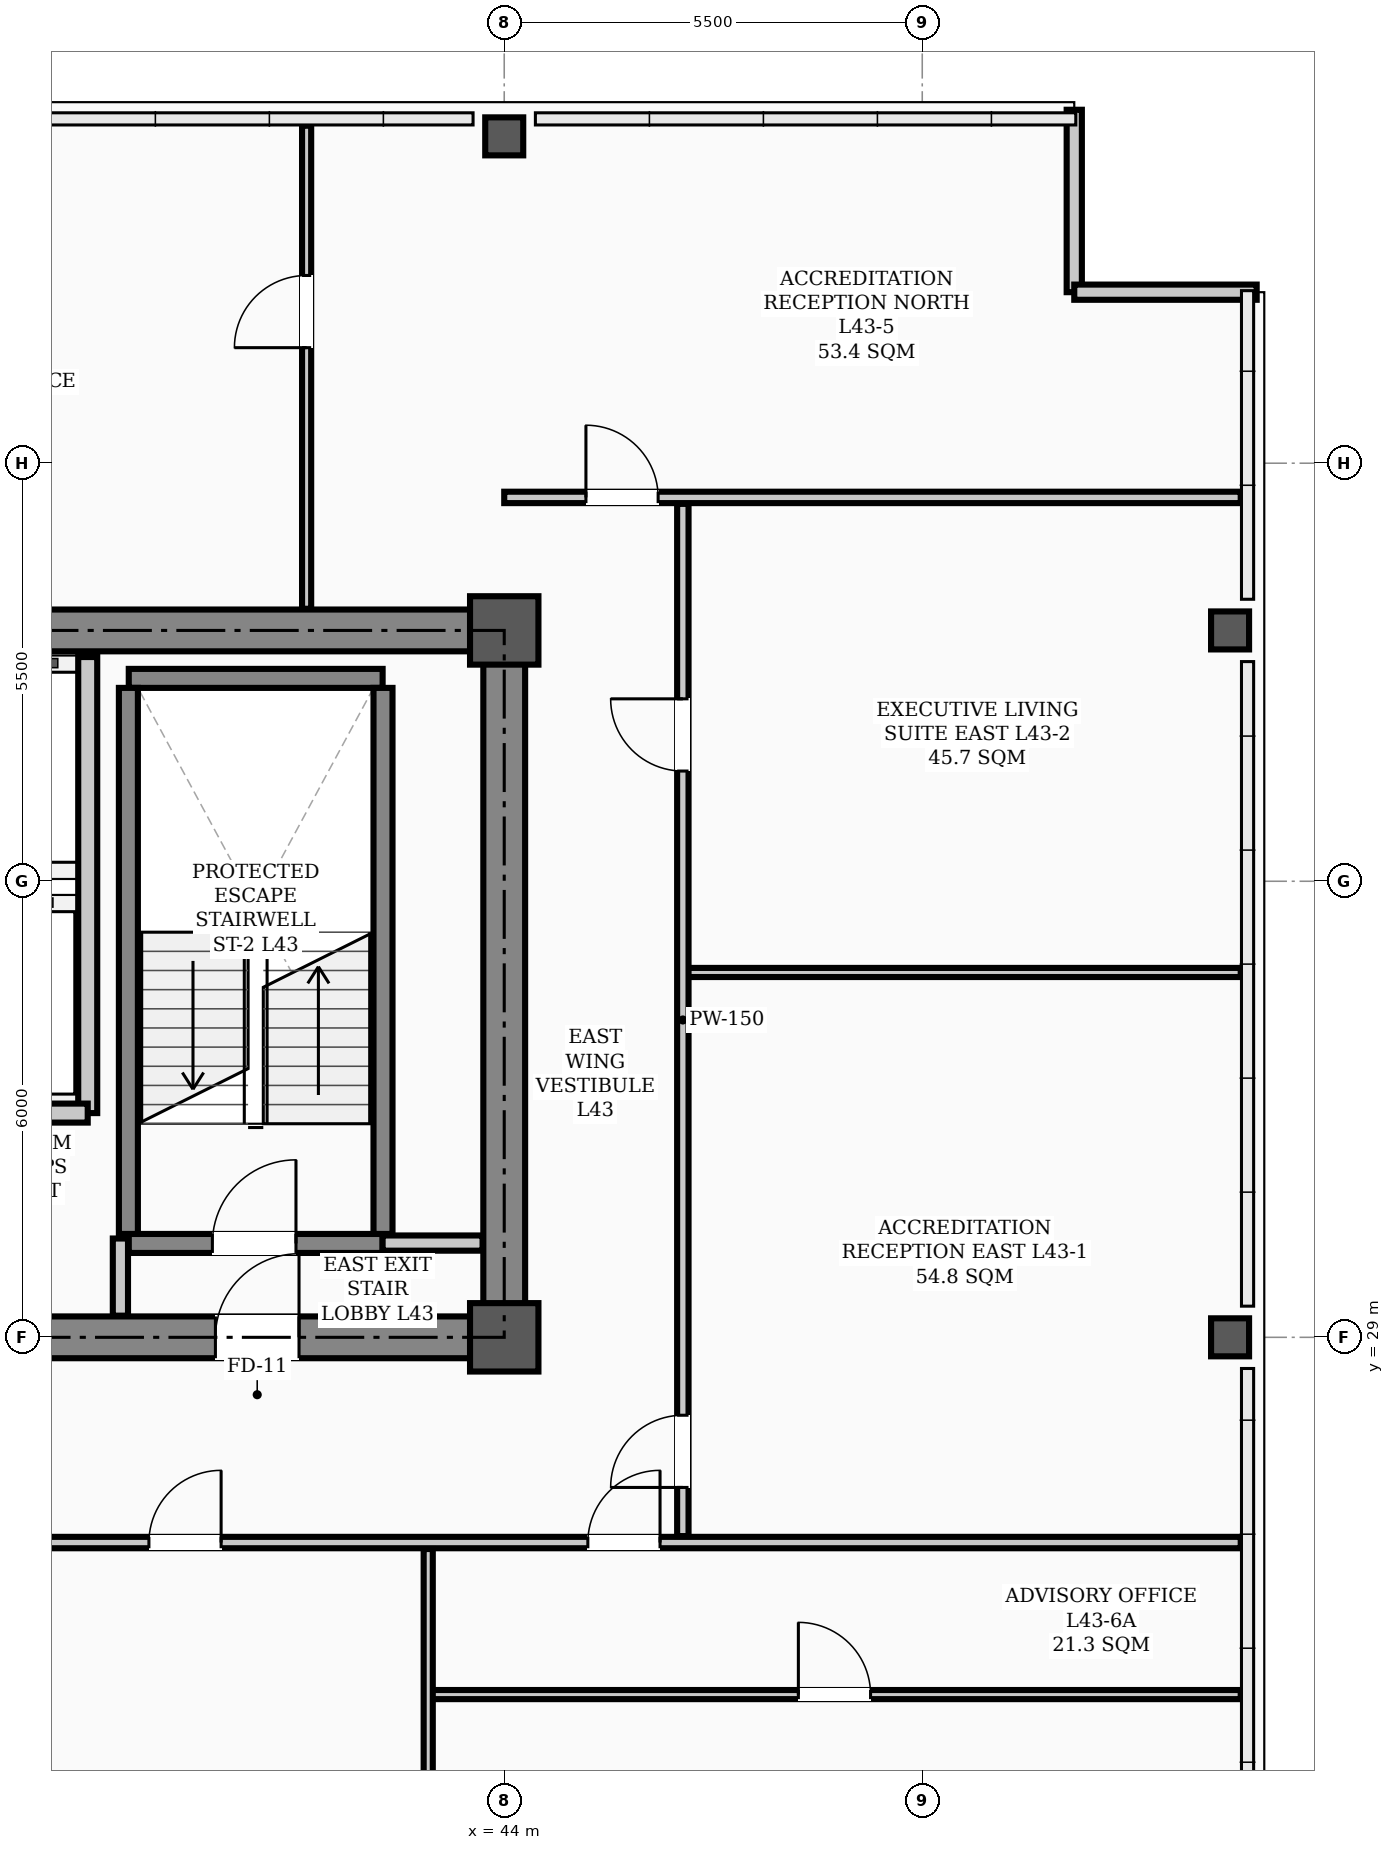
"""IFC4 building model, lengths in metres.
Left out: names, types, materials, properties, quantities, classifications, styles, units other than length and angle.
Written with IfcOpenShell. Run it as: python <this file> out.ifc"""

import sys

from ifc_helpers import new_model, si_unit, direction, frame, frame_2d, origin, origin_2d, place, context, subcontext, project, spatial, rectangle, hollow_rectangle, extrude, element, fill, save


model = new_model("IFC4")
c1 = context("Model", 3, precision=1e-05, world=origin(), true_north=direction((0.0, 1.0)))
c2 = subcontext(c1, "Body", "Model", "MODEL_VIEW")
j1 = project(units=[si_unit("LENGTHUNIT", "METRE"), si_unit("PLANEANGLEUNIT", "RADIAN")], contexts=[c1])
p1 = place(None, origin())
s1 = spatial("IfcSite", under=j1, at=p1, CompositionType="ELEMENT")
p2 = place(p1, origin())
s2 = spatial("IfcBuilding", under=s1, at=p2, CompositionType="ELEMENT")
p3 = place(p2, frame((0.0, 0.0, 173.4)))
s3 = spatial("IfcBuildingStorey", under=s2, at=p3, CompositionType="ELEMENT", Elevation=173.4)
for number, where, z_axis, x_axis in (
    (1, (44.0, 29.0, 0.0), (0.0, 0.0, 1.0), (1.0, 0.0, 0.0)),
    (2, (44.0, 38.3, 0.0), (0.0, 0.0, 1.0), (1.0, 0.0, 0.0)),
):
    element("IfcColumn", number, at=place(p3, frame(where, z_axis=z_axis, x_axis=x_axis)), inside=s3, PredefinedType="COLUMN", context=c2, shape_type="SweptSolid", body=[
        extrude(hollow_rectangle(XDim=0.9, YDim=0.9, WallThickness=0.035, InnerFilletRadius=0.017, OuterFilletRadius=0.052, at=origin_2d()), origin(), (0.0, 0.0, 1.0), 3.9),
    ])
for number, where, z_axis, x_axis in (
    (3, (44.0, 44.8, 0.0), (0.0, 0.0, 1.0), (1.0, 0.0, 0.0)),
    (4, (53.55, 29.0, 0.0), (0.0, 0.0, 1.0), (1.0, 0.0, 0.0)),
    (5, (53.55, 38.3, 0.0), (0.0, 0.0, 1.0), (1.0, 0.0, 0.0)),
):
    element("IfcColumn", number, at=place(p3, frame(where, z_axis=z_axis, x_axis=x_axis)), inside=s3, PredefinedType="COLUMN", context=c2, shape_type="SweptSolid", body=[
        extrude(hollow_rectangle(XDim=0.5, YDim=0.5, WallThickness=0.024, InnerFilletRadius=0.012, OuterFilletRadius=0.036, at=origin_2d()), origin(), (0.0, 0.0, 1.0), 3.9),
    ])
for number, where, z_axis, x_axis in (
    (6, (51.5, 45.15, 0.0), (0.0, 0.0, 1.0), (0.0, -1.0, 0.0)),
    (7, (51.5, 42.75, 0.0), (0.0, 0.0, 1.0), (1.0, 0.0, 0.0)),
):
    element("IfcWall", number, at=place(p3, frame(where, z_axis=z_axis, x_axis=x_axis)), inside=s3, PredefinedType="PARAPET", context=c2, shape_type="SweptSolid", body=[
        extrude(rectangle(XDim=2.4, YDim=0.2, at=frame_2d((1.2, 0.0))), origin(), (0.0, 0.0, 1.0), 1.2),
    ])
p4 = place(p3, frame((13.5, 29.0, 0.0), z_axis=(0.0, 0.0, 1.0), x_axis=(1.0, 0.0, 0.0)))
e8 = element("IfcWall", 8, at=p4, inside=s3, PredefinedType="SHEAR", context=c2, shape_type="SweptSolid", body=[
    extrude(rectangle(XDim=30.5, YDim=0.55, at=frame_2d((15.25, 0.0))), origin(), (0.0, 0.0, 1.0), 3.72),
])
p5 = place(p4, frame((1.75, 0.0, 0.0)))
e9 = element("IfcOpeningElement", 9, at=p5, cuts=e8, PredefinedType="OPENING", context=c2, shape_type="SweptSolid", body=[
    extrude(rectangle(XDim=1.1, YDim=2.08, at=frame_2d((0.55, 1.04))), frame((0.0, 0.285, 0.0), z_axis=(0.0, -1.0, 0.0), x_axis=(1.0, 0.0, 0.0)), (0.0, 0.0, 1.0), 0.57),
])
p6 = place(p4, frame((26.7, 0.0, 0.0)))
e10 = element("IfcOpeningElement", 10, at=p6, cuts=e8, PredefinedType="OPENING", context=c2, shape_type="SweptSolid", body=[
    extrude(rectangle(XDim=1.1, YDim=2.08, at=frame_2d((0.55, 1.04))), frame((0.0, 0.285, 0.0), z_axis=(0.0, -1.0, 0.0), x_axis=(1.0, 0.0, 0.0)), (0.0, 0.0, 1.0), 0.57),
])
p7 = place(p4, frame((6.8, 0.0, 0.0)))
e11 = element("IfcOpeningElement", 11, at=p7, cuts=e8, PredefinedType="OPENING", context=c2, shape_type="SweptSolid", body=[
    extrude(rectangle(XDim=1.1, YDim=2.08, at=frame_2d((0.55, 1.04))), frame((0.0, 0.285, 0.0), z_axis=(0.0, -1.0, 0.0), x_axis=(1.0, 0.0, 0.0)), (0.0, 0.0, 1.0), 0.57),
])
p8 = place(p4, frame((13.2, 0.0, 0.0)))
e12 = element("IfcOpeningElement", 12, at=p8, cuts=e8, PredefinedType="OPENING", context=c2, shape_type="SweptSolid", body=[
    extrude(rectangle(XDim=1.6, YDim=2.08, at=frame_2d((0.8, 1.04))), frame((0.0, 0.285, 0.0), z_axis=(0.0, -1.0, 0.0), x_axis=(1.0, 0.0, 0.0)), (0.0, 0.0, 1.0), 0.57),
])
p9 = place(p4, frame((19.6, 0.0, 0.0)))
e13 = element("IfcOpeningElement", 13, at=p9, cuts=e8, PredefinedType="OPENING", context=c2, shape_type="SweptSolid", body=[
    extrude(rectangle(XDim=0.9, YDim=2.08, at=frame_2d((0.45, 1.04))), frame((0.0, 0.285, 0.0), z_axis=(0.0, -1.0, 0.0), x_axis=(1.0, 0.0, 0.0)), (0.0, 0.0, 1.0), 0.57),
])
p10 = place(p4, frame((21.6, 0.0, 0.0)))
e14 = element("IfcOpeningElement", 14, at=p10, cuts=e8, PredefinedType="OPENING", context=c2, shape_type="SweptSolid", body=[
    extrude(rectangle(XDim=0.9, YDim=2.08, at=frame_2d((0.45, 1.04))), frame((0.0, 0.285, 0.0), z_axis=(0.0, -1.0, 0.0), x_axis=(1.0, 0.0, 0.0)), (0.0, 0.0, 1.0), 0.57),
])
p11 = place(p3, frame((13.5, 38.3, 0.0), z_axis=(0.0, 0.0, 1.0), x_axis=(1.0, 0.0, 0.0)))
e15 = element("IfcWall", 15, at=p11, inside=s3, PredefinedType="SHEAR", context=c2, shape_type="SweptSolid", body=[
    extrude(rectangle(XDim=30.5, YDim=0.55, at=frame_2d((15.25, 0.0))), origin(), (0.0, 0.0, 1.0), 3.72),
])
p12 = place(p3, frame((44.0, 29.35, 0.0), z_axis=(0.0, 0.0, 1.0), x_axis=(0.0, 1.0, 0.0)))
e16 = element("IfcWall", 16, at=p12, inside=s3, PredefinedType="SHEAR", context=c2, shape_type="SweptSolid", body=[
    extrude(rectangle(XDim=8.6, YDim=0.55, at=frame_2d((4.3, 0.0))), origin(), (0.0, 0.0, 1.0), 3.72),
])
p13 = place(p3, frame((39.06, 30.235, 0.0), z_axis=(0.0, 0.0, 1.0), x_axis=(1.0, 0.0, 0.0)))
e17 = element("IfcWall", 17, at=p13, inside=s3, PredefinedType="STANDARD", context=c2, shape_type="SweptSolid", body=[
    extrude(rectangle(XDim=3.34, YDim=0.25, at=frame_2d((1.67, 0.0))), origin(), (0.0, 0.0, 1.0), 3.72),
])
p14 = place(p13, frame((1.1, 0.0, 0.0)))
e18 = element("IfcOpeningElement", 18, at=p14, cuts=e17, PredefinedType="OPENING", context=c2, shape_type="SweptSolid", body=[
    extrude(rectangle(XDim=1.1, YDim=2.08, at=frame_2d((0.55, 1.04))), frame((0.0, 0.135, 0.0), z_axis=(0.0, -1.0, 0.0), x_axis=(1.0, 0.0, 0.0)), (0.0, 0.0, 1.0), 0.27),
])
p15 = place(p3, frame((39.06, 37.669, 0.0), z_axis=(0.0, 0.0, 1.0), x_axis=(1.0, 0.0, 0.0)))
e19 = element("IfcWall", 19, at=p15, inside=s3, PredefinedType="STANDARD", context=c2, shape_type="SweptSolid", body=[
    extrude(rectangle(XDim=3.34, YDim=0.25, at=frame_2d((1.67, 0.0))), origin(), (0.0, 0.0, 1.0), 3.72),
])
for number, where, z_axis, x_axis in (
    (20, (39.055, 30.36, 0.0), (0.0, 0.0, 1.0), (0.0, 1.0, 0.0)),
    (21, (42.405, 30.36, 0.0), (0.0, 0.0, 1.0), (0.0, 1.0, 0.0)),
):
    element("IfcWall", number, at=place(p3, frame(where, z_axis=z_axis, x_axis=x_axis)), inside=s3, PredefinedType="STANDARD", context=c2, shape_type="SweptSolid", body=[
        extrude(rectangle(XDim=7.184, YDim=0.25, at=frame_2d((3.592, 0.0))), origin(), (0.0, 0.0, 1.0), 3.72),
    ])
p16 = place(p3, frame((38.52, 31.95, 0.0), z_axis=(0.0, 0.0, 1.0), x_axis=(0.0, 1.0, 0.0)))
e22 = element("IfcWall", 22, at=p16, inside=s3, PredefinedType="STANDARD", context=c2, shape_type="SweptSolid", body=[
    extrude(rectangle(XDim=6.0, YDim=0.25, at=frame_2d((3.0, 0.0))), origin(), (0.0, 0.0, 1.0), 3.35),
])
p17 = place(p3, frame((36.62, 31.95, 0.0), z_axis=(0.0, 0.0, 1.0), x_axis=(1.0, 0.0, 0.0)))
e23 = element("IfcWall", 23, at=p17, inside=s3, PredefinedType="STANDARD", context=c2, shape_type="SweptSolid", body=[
    extrude(rectangle(XDim=1.9, YDim=0.25, at=frame_2d((0.95, 0.0))), origin(), (0.0, 0.0, 1.0), 3.48),
])
p18 = place(p3, frame((42.4, 30.24, 0.0), z_axis=(0.0, 0.0, 1.0), x_axis=(1.0, 0.0, 0.0)))
e24 = element("IfcWall", 24, at=p18, inside=s3, PredefinedType="STANDARD", context=c2, shape_type="SweptSolid", body=[
    extrude(rectangle(XDim=1.315, YDim=0.2, at=frame_2d((0.658, 0.0))), origin(), (0.0, 0.0, 1.0), 3.2),
])
p19 = place(p3, frame((10.31, 26.3, 0.0), z_axis=(0.0, 0.0, 1.0), x_axis=(1.0, 0.0, 0.0)))
e25 = element("IfcWall", 25, at=p19, inside=s3, PredefinedType="PARTITIONING", context=c2, shape_type="SweptSolid", body=[
    extrude(rectangle(XDim=43.38, YDim=0.15, at=frame_2d((21.69, 0.0))), origin(), (0.0, 0.0, 1.0), 3.2),
])
p20 = place(p19, frame((0.575, 0.0, 0.0)))
e26 = element("IfcOpeningElement", 26, at=p20, cuts=e25, PredefinedType="OPENING", context=c2, shape_type="SweptSolid", body=[
    extrude(rectangle(XDim=0.95, YDim=2.08, at=frame_2d((0.475, 1.04))), frame((0.0, 0.085, 0.0), z_axis=(0.0, -1.0, 0.0), x_axis=(1.0, 0.0, 0.0)), (0.0, 0.0, 1.0), 0.17),
])
p21 = place(p19, frame((9.415, 0.0, 0.0)))
e27 = element("IfcOpeningElement", 27, at=p21, cuts=e25, PredefinedType="OPENING", context=c2, shape_type="SweptSolid", body=[
    extrude(rectangle(XDim=0.95, YDim=2.08, at=frame_2d((0.475, 1.04))), frame((0.0, 0.085, 0.0), z_axis=(0.0, -1.0, 0.0), x_axis=(1.0, 0.0, 0.0)), (0.0, 0.0, 1.0), 0.17),
])
p22 = place(p19, frame((16.115, 0.0, 0.0)))
e28 = element("IfcOpeningElement", 28, at=p22, cuts=e25, PredefinedType="OPENING", context=c2, shape_type="SweptSolid", body=[
    extrude(rectangle(XDim=0.95, YDim=2.08, at=frame_2d((0.475, 1.04))), frame((0.0, 0.085, 0.0), z_axis=(0.0, -1.0, 0.0), x_axis=(1.0, 0.0, 0.0)), (0.0, 0.0, 1.0), 0.17),
])
p23 = place(p19, frame((22.715, 0.0, 0.0)))
e29 = element("IfcOpeningElement", 29, at=p23, cuts=e25, PredefinedType="OPENING", context=c2, shape_type="SweptSolid", body=[
    extrude(rectangle(XDim=0.95, YDim=2.08, at=frame_2d((0.475, 1.04))), frame((0.0, 0.085, 0.0), z_axis=(0.0, -1.0, 0.0), x_axis=(1.0, 0.0, 0.0)), (0.0, 0.0, 1.0), 0.17),
])
p24 = place(p19, frame((29.015, 0.0, 0.0)))
e30 = element("IfcOpeningElement", 30, at=p24, cuts=e25, PredefinedType="OPENING", context=c2, shape_type="SweptSolid", body=[
    extrude(rectangle(XDim=0.95, YDim=2.08, at=frame_2d((0.475, 1.04))), frame((0.0, 0.085, 0.0), z_axis=(0.0, -1.0, 0.0), x_axis=(1.0, 0.0, 0.0)), (0.0, 0.0, 1.0), 0.17),
])
p25 = place(p19, frame((34.79, 0.0, 0.0)))
e31 = element("IfcOpeningElement", 31, at=p25, cuts=e25, PredefinedType="OPENING", context=c2, shape_type="SweptSolid", body=[
    extrude(rectangle(XDim=0.95, YDim=2.08, at=frame_2d((0.475, 1.04))), frame((0.0, 0.085, 0.0), z_axis=(0.0, -1.0, 0.0), x_axis=(1.0, 0.0, 0.0)), (0.0, 0.0, 1.0), 0.17),
])
p26 = place(p3, frame((43.0, 24.3, 0.0), z_axis=(0.0, 0.0, 1.0), x_axis=(1.0, 0.0, 0.0)))
e32 = element("IfcWall", 32, at=p26, inside=s3, PredefinedType="PARTITIONING", context=c2, shape_type="SweptSolid", body=[
    extrude(rectangle(XDim=10.69, YDim=0.12, at=frame_2d((5.345, 0.0))), origin(), (0.0, 0.0, 1.0), 3.2),
])
p27 = place(p26, frame((4.87, 0.0, 0.0)))
e33 = element("IfcOpeningElement", 33, at=p27, cuts=e32, PredefinedType="OPENING", context=c2, shape_type="SweptSolid", body=[
    extrude(rectangle(XDim=0.95, YDim=2.08, at=frame_2d((0.475, 1.04))), frame((0.0, 0.07, 0.0), z_axis=(0.0, -1.0, 0.0), x_axis=(1.0, 0.0, 0.0)), (0.0, 0.0, 1.0), 0.14),
])
p28 = place(p3, frame((46.35, 33.8, 0.0), z_axis=(0.0, 0.0, 1.0), x_axis=(1.0, 0.0, 0.0)))
e34 = element("IfcWall", 34, at=p28, inside=s3, PredefinedType="PARTITIONING", context=c2, shape_type="SweptSolid", body=[
    extrude(rectangle(XDim=7.34, YDim=0.12, at=frame_2d((3.67, 0.0))), origin(), (0.0, 0.0, 1.0), 3.212),
])
p29 = place(p3, frame((44.0, 40.05, 0.0), z_axis=(0.0, 0.0, 1.0), x_axis=(1.0, 0.0, 0.0)))
e35 = element("IfcWall", 35, at=p29, inside=s3, PredefinedType="PARTITIONING", context=c2, shape_type="SweptSolid", body=[
    extrude(rectangle(XDim=9.69, YDim=0.15, at=frame_2d((4.845, 0.0))), origin(), (0.0, 0.0, 1.0), 3.2),
])
p30 = place(p29, frame((1.075, 0.0, 0.0)))
e36 = element("IfcOpeningElement", 36, at=p30, cuts=e35, PredefinedType="OPENING", context=c2, shape_type="SweptSolid", body=[
    extrude(rectangle(XDim=0.95, YDim=2.08, at=frame_2d((0.475, 1.04))), frame((0.0, 0.085, 0.0), z_axis=(0.0, -1.0, 0.0), x_axis=(1.0, 0.0, 0.0)), (0.0, 0.0, 1.0), 0.17),
])
p31 = place(p3, frame((38.95, 29.285, 0.0), z_axis=(0.0, 0.0, 1.0), x_axis=(0.0, 1.0, 0.0)))
e37 = element("IfcWall", 37, at=p31, inside=s3, PredefinedType="STANDARD", context=c2, shape_type="SweptSolid", body=[
    extrude(rectangle(XDim=1.015, YDim=0.2, at=frame_2d((0.508, 0.0))), origin(), (0.0, 0.0, 1.0), 3.35),
])
p32 = place(p3, frame((46.35, 26.385, 0.0), z_axis=(0.0, 0.0, 1.0), x_axis=(0.0, 1.0, 0.0)))
e38 = element("IfcWall", 38, at=p32, inside=s3, PredefinedType="PARTITIONING", context=c2, shape_type="SweptSolid", body=[
    extrude(rectangle(XDim=13.58, YDim=0.15, at=frame_2d((6.79, 0.0))), origin(), (0.0, 0.0, 1.0), 3.1),
])
p33 = place(p32, frame((0.64, 0.0, 0.0)))
e39 = element("IfcOpeningElement", 39, at=p33, cuts=e38, PredefinedType="OPENING", context=c2, shape_type="SweptSolid", body=[
    extrude(rectangle(XDim=0.95, YDim=2.08, at=frame_2d((0.475, 1.04))), frame((0.0, 0.085, 0.0), z_axis=(0.0, -1.0, 0.0), x_axis=(1.0, 0.0, 0.0)), (0.0, 0.0, 1.0), 0.17),
])
p34 = place(p32, frame((10.065, 0.0, 0.0)))
e40 = element("IfcOpeningElement", 40, at=p34, cuts=e38, PredefinedType="OPENING", context=c2, shape_type="SweptSolid", body=[
    extrude(rectangle(XDim=0.95, YDim=2.08, at=frame_2d((0.475, 1.04))), frame((0.0, 0.085, 0.0), z_axis=(0.0, -1.0, 0.0), x_axis=(1.0, 0.0, 0.0)), (0.0, 0.0, 1.0), 0.17),
])
p35 = place(p3, frame((43.0, 17.06, 0.0), z_axis=(0.0, 0.0, 1.0), x_axis=(0.0, 1.0, 0.0)))
e41 = element("IfcWall", 41, at=p35, inside=s3, PredefinedType="PARTITIONING", context=c2, shape_type="SweptSolid", body=[
    extrude(rectangle(XDim=9.155, YDim=0.12, at=frame_2d((4.578, 0.0))), origin(), (0.0, 0.0, 1.0), 3.1),
])
p36 = place(p3, frame((41.4, 38.585, 0.0), z_axis=(0.0, 0.0, 1.0), x_axis=(0.0, 1.0, 0.0)))
e42 = element("IfcWall", 42, at=p36, inside=s3, PredefinedType="PARTITIONING", context=c2, shape_type="SweptSolid", body=[
    extrude(rectangle(XDim=6.355, YDim=0.12, at=frame_2d((3.177, 0.0))), origin(), (0.0, 0.0, 1.0), 3.212),
])
p37 = place(p36, frame((3.435, 0.0, 0.0)))
e43 = element("IfcOpeningElement", 43, at=p37, cuts=e42, PredefinedType="OPENING", context=c2, shape_type="SweptSolid", body=[
    extrude(rectangle(XDim=0.95, YDim=2.08, at=frame_2d((0.475, 1.04))), frame((0.0, 0.07, 0.0), z_axis=(0.0, -1.0, 0.0), x_axis=(1.0, 0.0, 0.0)), (0.0, 0.0, 1.0), 0.14),
])
p38 = place(p14, origin())
e44 = element("IfcDoor", 44, at=p38, inside=s3, OperationType="SINGLE_SWING_RIGHT", PredefinedType="DOOR", context=c2, shape_type="SweptSolid", body=[
    extrude(rectangle(XDim=1.1, YDim=2.08, at=frame_2d((0.55, 1.04))), frame((0.0, 0.025, 0.0), z_axis=(0.0, -1.0, 0.0), x_axis=(1.0, 0.0, 0.0)), (0.0, 0.0, 1.0), 0.05),
])
fill(e18, e44)
p39 = place(p6, origin())
e45 = element("IfcDoor", 45, at=p39, inside=s3, OperationType="SINGLE_SWING_RIGHT", PredefinedType="DOOR", context=c2, shape_type="SweptSolid", body=[
    extrude(rectangle(XDim=1.1, YDim=2.08, at=frame_2d((0.55, 1.04))), frame((0.0, 0.025, 0.0), z_axis=(0.0, -1.0, 0.0), x_axis=(1.0, 0.0, 0.0)), (0.0, 0.0, 1.0), 0.05),
])
fill(e10, e45)
p40 = place(p24, origin())
e46 = element("IfcDoor", 46, at=p40, inside=s3, OperationType="SINGLE_SWING_RIGHT", PredefinedType="DOOR", context=c2, shape_type="SweptSolid", body=[
    extrude(rectangle(XDim=0.95, YDim=2.08, at=frame_2d((0.475, 1.04))), frame((0.0, 0.025, 0.0), z_axis=(0.0, -1.0, 0.0), x_axis=(1.0, 0.0, 0.0)), (0.0, 0.0, 1.0), 0.05),
])
fill(e30, e46)
p41 = place(p27, origin())
e47 = element("IfcDoor", 47, at=p41, inside=s3, OperationType="SINGLE_SWING_LEFT", PredefinedType="DOOR", context=c2, shape_type="SweptSolid", body=[
    extrude(rectangle(XDim=0.95, YDim=2.08, at=frame_2d((0.475, 1.04))), frame((0.0, 0.025, 0.0), z_axis=(0.0, -1.0, 0.0), x_axis=(1.0, 0.0, 0.0)), (0.0, 0.0, 1.0), 0.05),
])
fill(e33, e47)
p42 = place(p25, origin())
e48 = element("IfcDoor", 48, at=p42, inside=s3, OperationType="SINGLE_SWING_RIGHT", PredefinedType="DOOR", context=c2, shape_type="SweptSolid", body=[
    extrude(rectangle(XDim=0.95, YDim=2.08, at=frame_2d((0.475, 1.04))), frame((0.0, 0.025, 0.0), z_axis=(0.0, -1.0, 0.0), x_axis=(1.0, 0.0, 0.0)), (0.0, 0.0, 1.0), 0.05),
])
fill(e31, e48)
p43 = place(p33, origin())
e49 = element("IfcDoor", 49, at=p43, inside=s3, OperationType="SINGLE_SWING_LEFT", PredefinedType="DOOR", context=c2, shape_type="SweptSolid", body=[
    extrude(rectangle(XDim=0.95, YDim=2.08, at=frame_2d((0.475, 1.04))), frame((0.0, 0.025, 0.0), z_axis=(0.0, -1.0, 0.0), x_axis=(1.0, 0.0, 0.0)), (0.0, 0.0, 1.0), 0.05),
])
fill(e39, e49)
p44 = place(p34, origin())
e50 = element("IfcDoor", 50, at=p44, inside=s3, OperationType="SINGLE_SWING_RIGHT", PredefinedType="DOOR", context=c2, shape_type="SweptSolid", body=[
    extrude(rectangle(XDim=0.95, YDim=2.08, at=frame_2d((0.475, 1.04))), frame((0.0, 0.025, 0.0), z_axis=(0.0, -1.0, 0.0), x_axis=(1.0, 0.0, 0.0)), (0.0, 0.0, 1.0), 0.05),
])
fill(e40, e50)
p45 = place(p30, origin())
e51 = element("IfcDoor", 51, at=p45, inside=s3, OperationType="SINGLE_SWING_LEFT", PredefinedType="DOOR", context=c2, shape_type="SweptSolid", body=[
    extrude(rectangle(XDim=0.95, YDim=2.08, at=frame_2d((0.475, 1.04))), frame((0.0, 0.025, 0.0), z_axis=(0.0, -1.0, 0.0), x_axis=(1.0, 0.0, 0.0)), (0.0, 0.0, 1.0), 0.05),
])
fill(e36, e51)
p46 = place(p37, origin())
e52 = element("IfcDoor", 52, at=p46, inside=s3, OperationType="SINGLE_SWING_LEFT", PredefinedType="DOOR", context=c2, shape_type="SweptSolid", body=[
    extrude(rectangle(XDim=0.95, YDim=2.08, at=frame_2d((0.475, 1.04))), frame((0.0, 0.025, 0.0), z_axis=(0.0, -1.0, 0.0), x_axis=(1.0, 0.0, 0.0)), (0.0, 0.0, 1.0), 0.05),
])
fill(e43, e52)
save(model, sys.argv[1])
